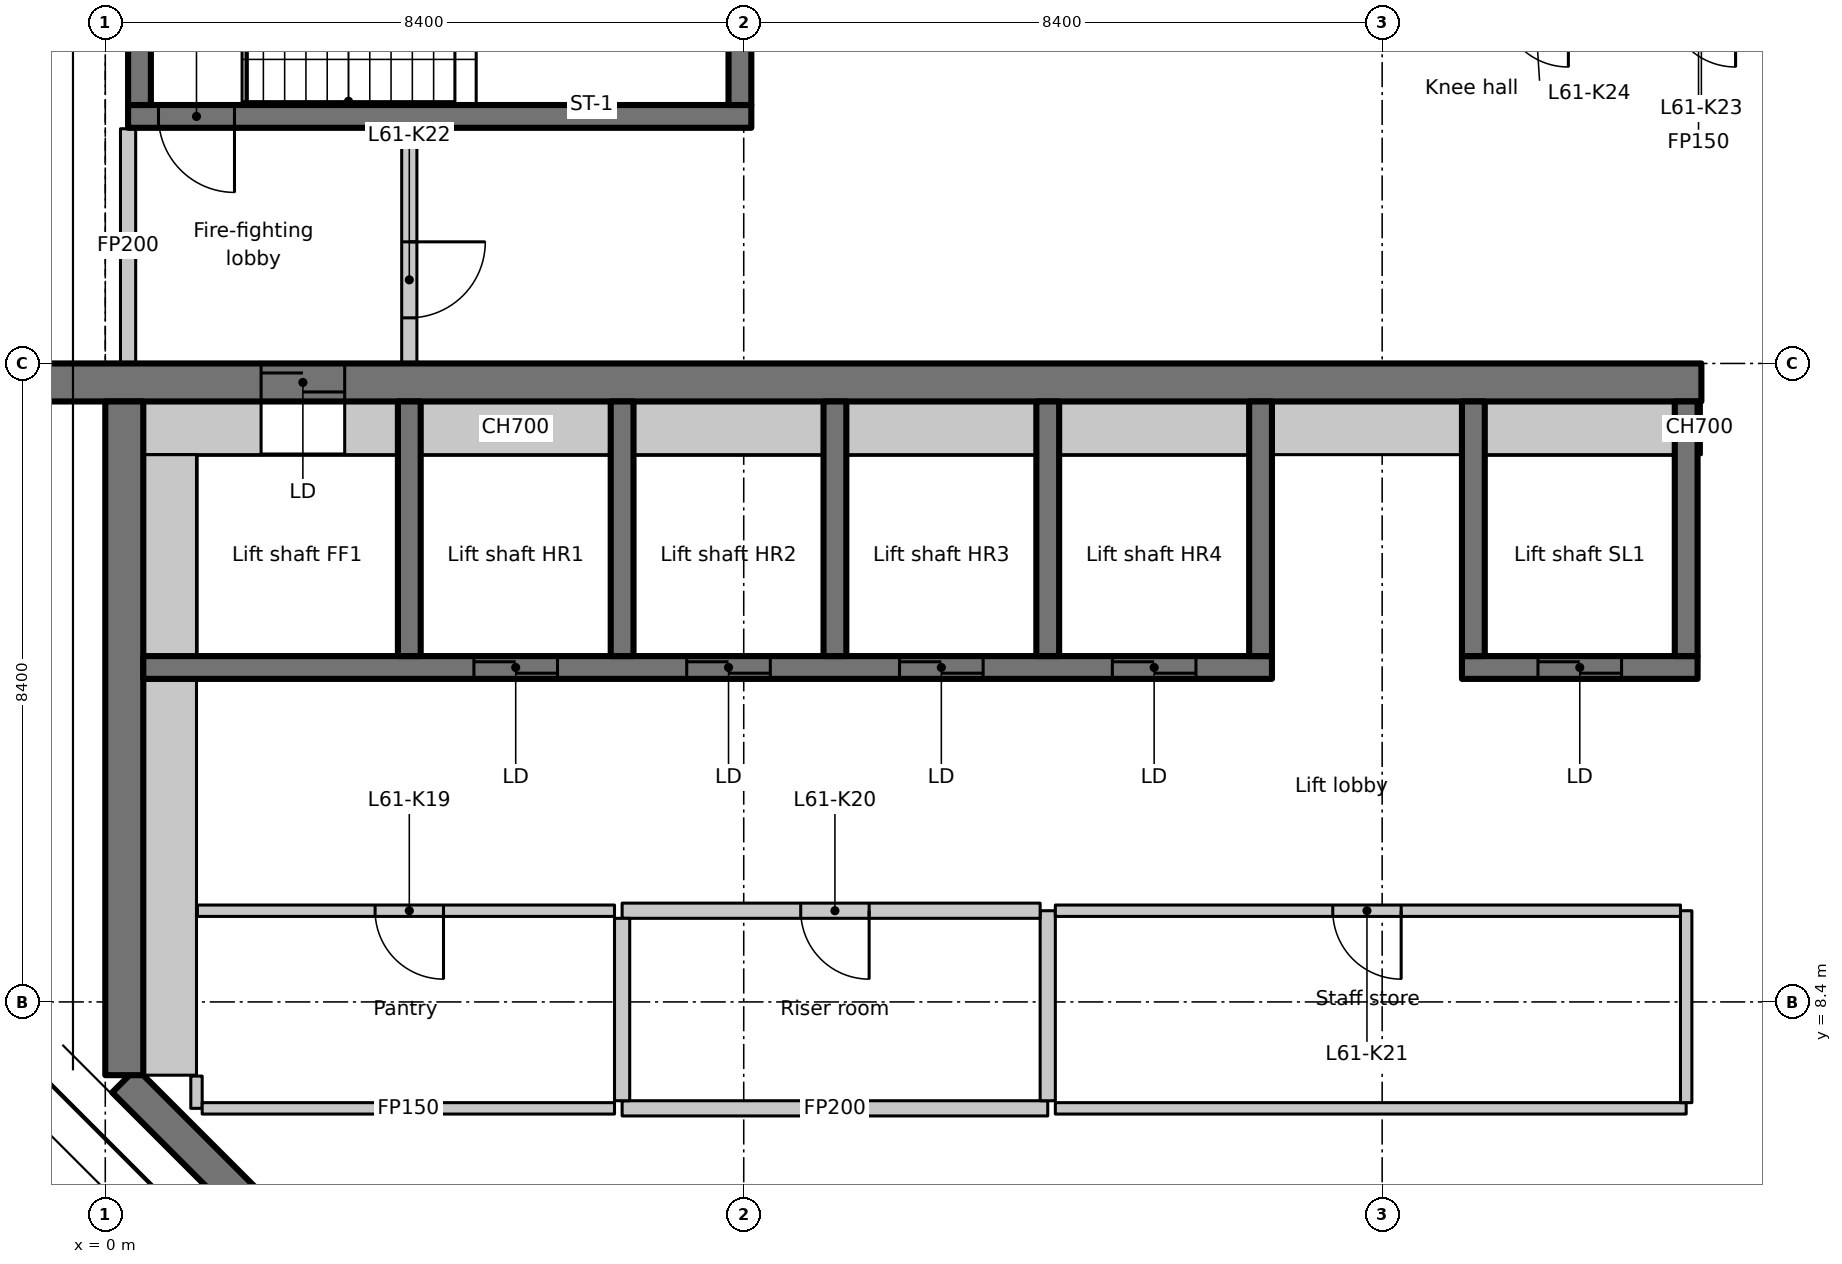
"""IFC4 building model, lengths in metres.
Left out: names, types, materials, properties, quantities, classifications, styles, units other than length and angle.
Written with IfcOpenShell. Run it as: python <this file> out.ifc"""

import sys

from ifc_helpers import new_model, si_unit, direction, frame, frame_2d, origin, place, context, subcontext, project, spatial, rectangle, extrude, element, fill, save


model = new_model("IFC4")
c1 = context("Model", 3, precision=1e-05, world=origin(), true_north=direction((0.0, 1.0)))
c2 = subcontext(c1, "Body", "Model", "MODEL_VIEW")
j1 = project(units=[si_unit("LENGTHUNIT", "METRE"), si_unit("PLANEANGLEUNIT", "RADIAN")], contexts=[c1])
p1 = place(None, origin())
s1 = spatial("IfcSite", under=j1, at=p1, CompositionType="ELEMENT")
p2 = place(p1, origin())
s2 = spatial("IfcBuilding", under=s1, at=p2, CompositionType="ELEMENT")
p3 = place(p2, frame((0.0, 0.0, 240.9)))
s3 = spatial("IfcBuildingStorey", under=s2, at=p3, CompositionType="ELEMENT", Elevation=240.9)
p4 = place(p3, frame((0.25, 7.368, 0.0), z_axis=(0.0, 0.0, 1.0), x_axis=(0.707106781187, -0.707106781187, 0.0)))
e1 = element("IfcWall", 1, at=p4, inside=s3, PredefinedType="SHEAR", context=c2, shape_type="SweptSolid", body=[
    extrude(rectangle(XDim=10.067, YDim=0.45, at=frame_2d((5.033, 0.0))), origin(), (0.0, 0.0, 1.0), 3.35),
])
p5 = place(p3, frame((-1.1, 16.55, 0.0), z_axis=(0.0, 0.0, 1.0), x_axis=(1.0, 0.0, 0.0)))
e2 = element("IfcWall", 2, at=p5, inside=s3, PredefinedType="SHEAR", context=c2, shape_type="SweptSolid", body=[
    extrude(rectangle(XDim=22.1, YDim=0.5, at=frame_2d((11.05, 0.0))), origin(), (0.0, 0.0, 1.0), 3.35),
])
p6 = place(p5, frame((3.15, 0.0, 0.0)))
e3 = element("IfcOpeningElement", 3, at=p6, cuts=e2, PredefinedType="OPENING", context=c2, shape_type="SweptSolid", body=[
    extrude(rectangle(XDim=1.1, YDim=2.3, at=frame_2d((0.55, 1.15))), frame((0.0, 0.26, 0.0), z_axis=(0.0, -1.0, 0.0), x_axis=(1.0, 0.0, 0.0)), (0.0, 0.0, 1.0), 0.52),
])
p7 = place(p3, frame((0.25, 7.436, 0.0), z_axis=(0.0, 0.0, 1.0), x_axis=(0.0, 1.0, 0.0)))
e4 = element("IfcWall", 4, at=p7, inside=s3, PredefinedType="SHEAR", context=c2, shape_type="SweptSolid", body=[
    extrude(rectangle(XDim=8.864, YDim=0.5, at=frame_2d((4.432, 0.0))), origin(), (0.0, 0.0, 1.0), 3.35),
])
p8 = place(p3, frame((0.5, 15.95, 0.0), z_axis=(0.0, 0.0, 1.0), x_axis=(1.0, 0.0, 0.0)))
e5 = element("IfcWall", 5, at=p8, inside=s3, PredefinedType="PARTITIONING", context=c2, shape_type="SweptSolid", body=[
    extrude(rectangle(XDim=1.55, YDim=0.7, at=frame_2d((0.775, 0.0))), origin(), (0.0, 0.0, 1.0), 3.35),
])
p9 = place(p3, frame((0.5, 12.8, 0.0), z_axis=(0.0, 0.0, 1.0), x_axis=(1.0, 0.0, 0.0)))
e6 = element("IfcWall", 6, at=p9, inside=s3, PredefinedType="SHEAR", context=c2, shape_type="SweptSolid", body=[
    extrude(rectangle(XDim=14.85, YDim=0.3, at=frame_2d((7.425, 0.0))), origin(), (0.0, 0.0, 1.0), 3.35),
])
p10 = place(p9, frame((4.35, 0.0, 0.0)))
e7 = element("IfcOpeningElement", 7, at=p10, cuts=e6, PredefinedType="OPENING", context=c2, shape_type="SweptSolid", body=[
    extrude(rectangle(XDim=1.1, YDim=2.3, at=frame_2d((0.55, 1.15))), frame((0.0, 0.16, 0.0), z_axis=(0.0, -1.0, 0.0), x_axis=(1.0, 0.0, 0.0)), (0.0, 0.0, 1.0), 0.32),
])
p11 = place(p9, frame((7.15, 0.0, 0.0)))
e8 = element("IfcOpeningElement", 8, at=p11, cuts=e6, PredefinedType="OPENING", context=c2, shape_type="SweptSolid", body=[
    extrude(rectangle(XDim=1.1, YDim=2.3, at=frame_2d((0.55, 1.15))), frame((0.0, 0.16, 0.0), z_axis=(0.0, -1.0, 0.0), x_axis=(1.0, 0.0, 0.0)), (0.0, 0.0, 1.0), 0.32),
])
p12 = place(p9, frame((9.95, 0.0, 0.0)))
e9 = element("IfcOpeningElement", 9, at=p12, cuts=e6, PredefinedType="OPENING", context=c2, shape_type="SweptSolid", body=[
    extrude(rectangle(XDim=1.1, YDim=2.3, at=frame_2d((0.55, 1.15))), frame((0.0, 0.16, 0.0), z_axis=(0.0, -1.0, 0.0), x_axis=(1.0, 0.0, 0.0)), (0.0, 0.0, 1.0), 0.32),
])
p13 = place(p9, frame((12.75, 0.0, 0.0)))
e10 = element("IfcOpeningElement", 10, at=p13, cuts=e6, PredefinedType="OPENING", context=c2, shape_type="SweptSolid", body=[
    extrude(rectangle(XDim=1.1, YDim=2.3, at=frame_2d((0.55, 1.15))), frame((0.0, 0.16, 0.0), z_axis=(0.0, -1.0, 0.0), x_axis=(1.0, 0.0, 0.0)), (0.0, 0.0, 1.0), 0.32),
])
for number, where, z_axis, x_axis in (
    (11, (4.0, 12.95, 0.0), (0.0, 0.0, 1.0), (0.0, 1.0, 0.0)),
    (12, (6.8, 12.95, 0.0), (0.0, 0.0, 1.0), (0.0, 1.0, 0.0)),
    (13, (9.6, 12.95, 0.0), (0.0, 0.0, 1.0), (0.0, 1.0, 0.0)),
    (14, (12.4, 12.95, 0.0), (0.0, 0.0, 1.0), (0.0, 1.0, 0.0)),
    (15, (15.2, 12.95, 0.0), (0.0, 0.0, 1.0), (0.0, 1.0, 0.0)),
):
    element("IfcWall", number, at=place(p3, frame(where, z_axis=z_axis, x_axis=x_axis)), inside=s3, PredefinedType="SHEAR", context=c2, shape_type="SweptSolid", body=[
        extrude(rectangle(XDim=3.35, YDim=0.3, at=frame_2d((1.675, 0.0))), origin(), (0.0, 0.0, 1.0), 3.35),
    ])
p14 = place(p3, frame((17.85, 12.8, 0.0), z_axis=(0.0, 0.0, 1.0), x_axis=(1.0, 0.0, 0.0)))
e16 = element("IfcWall", 16, at=p14, inside=s3, PredefinedType="SHEAR", context=c2, shape_type="SweptSolid", body=[
    extrude(rectangle(XDim=3.1, YDim=0.3, at=frame_2d((1.55, 0.0))), origin(), (0.0, 0.0, 1.0), 3.35),
])
p15 = place(p14, frame((1.0, 0.0, 0.0)))
e17 = element("IfcOpeningElement", 17, at=p15, cuts=e16, PredefinedType="OPENING", context=c2, shape_type="SweptSolid", body=[
    extrude(rectangle(XDim=1.1, YDim=2.3, at=frame_2d((0.55, 1.15))), frame((0.0, 0.16, 0.0), z_axis=(0.0, -1.0, 0.0), x_axis=(1.0, 0.0, 0.0)), (0.0, 0.0, 1.0), 0.32),
])
for number, where, z_axis, x_axis in (
    (18, (18.0, 12.95, 0.0), (0.0, 0.0, 1.0), (0.0, 1.0, 0.0)),
    (19, (20.8, 12.95, 0.0), (0.0, 0.0, 1.0), (0.0, 1.0, 0.0)),
):
    element("IfcWall", number, at=place(p3, frame(where, z_axis=z_axis, x_axis=x_axis)), inside=s3, PredefinedType="SHEAR", context=c2, shape_type="SweptSolid", body=[
        extrude(rectangle(XDim=3.35, YDim=0.3, at=frame_2d((1.675, 0.0))), origin(), (0.0, 0.0, 1.0), 3.35),
    ])
p16 = place(p3, frame((8.5, 20.05, 0.0), z_axis=(0.0, 0.0, 1.0), x_axis=(-1.0, 0.0, 0.0)))
e20 = element("IfcWall", 20, at=p16, inside=s3, PredefinedType="SHEAR", context=c2, shape_type="SweptSolid", body=[
    extrude(rectangle(XDim=8.2, YDim=0.3, at=frame_2d((4.1, 0.0))), origin(), (0.0, 0.0, 1.0), 3.35),
])
p17 = place(p16, frame((6.8, 0.0, 0.0)))
e21 = element("IfcOpeningElement", 21, at=p17, cuts=e20, PredefinedType="OPENING", context=c2, shape_type="SweptSolid", body=[
    extrude(rectangle(XDim=1.0, YDim=2.1, at=frame_2d((0.5, 1.05))), frame((0.0, 0.16, 0.0), z_axis=(0.0, -1.0, 0.0), x_axis=(1.0, 0.0, 0.0)), (0.0, 0.0, 1.0), 0.32),
])
for number, where, z_axis, x_axis in (
    (22, (0.45, 20.2, 0.0), (0.0, 0.0, 1.0), (0.0, 1.0, 0.0)),
    (23, (8.35, 20.2, 0.0), (0.0, 0.0, 1.0), (0.0, 1.0, 0.0)),
):
    element("IfcWall", number, at=place(p3, frame(where, z_axis=z_axis, x_axis=x_axis)), inside=s3, PredefinedType="SHEAR", context=c2, shape_type="SweptSolid", body=[
        extrude(rectangle(XDim=2.55, YDim=0.3, at=frame_2d((1.275, 0.0))), origin(), (0.0, 0.0, 1.0), 3.35),
    ])
p18 = place(p3, frame((0.3, 16.812, 0.0), z_axis=(0.0, 0.0, 1.0), x_axis=(0.0, 1.0, 0.0)))
e24 = element("IfcWall", 24, at=p18, inside=s3, PredefinedType="PARTITIONING", context=c2, shape_type="SweptSolid", body=[
    extrude(rectangle(XDim=3.076, YDim=0.2, at=frame_2d((1.538, 0.0))), origin(), (0.0, 0.0, 1.0), 2.98),
])
p19 = place(p3, frame((4.0, 19.888, 0.0), z_axis=(0.0, 0.0, 1.0), x_axis=(0.0, -1.0, 0.0)))
e25 = element("IfcWall", 25, at=p19, inside=s3, PredefinedType="PARTITIONING", context=c2, shape_type="SweptSolid", body=[
    extrude(rectangle(XDim=3.076, YDim=0.2, at=frame_2d((1.538, 0.0))), origin(), (0.0, 0.0, 1.0), 3.35),
])
p20 = place(p19, frame((1.488, 0.0, 0.0)))
e26 = element("IfcOpeningElement", 26, at=p20, cuts=e25, PredefinedType="OPENING", context=c2, shape_type="SweptSolid", body=[
    extrude(rectangle(XDim=1.0, YDim=2.1, at=frame_2d((0.5, 1.05))), frame((0.0, 0.11, 0.0), z_axis=(0.0, -1.0, 0.0), x_axis=(1.0, 0.0, 0.0)), (0.0, 0.0, 1.0), 0.22),
])
p21 = place(p3, frame((6.8, 7.0, 0.0), z_axis=(0.0, 0.0, 1.0), x_axis=(1.0, 0.0, 0.0)))
e27 = element("IfcWall", 27, at=p21, inside=s3, PredefinedType="PARTITIONING", context=c2, shape_type="SweptSolid", body=[
    extrude(rectangle(XDim=5.6, YDim=0.2, at=frame_2d((2.8, 0.0))), origin(), (0.0, 0.0, 1.0), 3.35),
])
p22 = place(p3, frame((12.4, 7.1, 0.0), z_axis=(0.0, 0.0, 1.0), x_axis=(0.0, 1.0, 0.0)))
e28 = element("IfcWall", 28, at=p22, inside=s3, PredefinedType="PARTITIONING", context=c2, shape_type="SweptSolid", body=[
    extrude(rectangle(XDim=2.5, YDim=0.2, at=frame_2d((1.25, 0.0))), origin(), (0.0, 0.0, 1.0), 3.35),
])
p23 = place(p3, frame((12.3, 9.6, 0.0), z_axis=(0.0, 0.0, 1.0), x_axis=(-1.0, 0.0, 0.0)))
e29 = element("IfcWall", 29, at=p23, inside=s3, PredefinedType="PARTITIONING", context=c2, shape_type="SweptSolid", body=[
    extrude(rectangle(XDim=5.5, YDim=0.2, at=frame_2d((2.75, 0.0))), origin(), (0.0, 0.0, 1.0), 3.35),
])
p24 = place(p23, frame((2.25, 0.0, 0.0)))
e30 = element("IfcOpeningElement", 30, at=p24, cuts=e29, PredefinedType="OPENING", context=c2, shape_type="SweptSolid", body=[
    extrude(rectangle(XDim=0.9, YDim=2.1, at=frame_2d((0.45, 1.05))), frame((0.0, 0.11, 0.0), z_axis=(0.0, -1.0, 0.0), x_axis=(1.0, 0.0, 0.0)), (0.0, 0.0, 1.0), 0.22),
])
p25 = place(p3, frame((6.8, 9.5, 0.0), z_axis=(0.0, 0.0, 1.0), x_axis=(0.0, -1.0, 0.0)))
e31 = element("IfcWall", 31, at=p25, inside=s3, PredefinedType="PARTITIONING", context=c2, shape_type="SweptSolid", body=[
    extrude(rectangle(XDim=2.4, YDim=0.2, at=frame_2d((1.2, 0.0))), origin(), (0.0, 0.0, 1.0), 3.35),
])
p26 = place(p3, frame((6.7, 9.6, 0.0), z_axis=(0.0, 0.0, 1.0), x_axis=(-1.0, 0.0, 0.0)))
e32 = element("IfcWall", 32, at=p26, inside=s3, PredefinedType="PARTITIONING", context=c2, shape_type="SweptSolid", body=[
    extrude(rectangle(XDim=5.488, YDim=0.15, at=frame_2d((2.744, 0.0))), origin(), (0.0, 0.0, 1.0), 3.35),
])
p27 = place(p26, frame((2.25, 0.0, 0.0)))
e33 = element("IfcOpeningElement", 33, at=p27, cuts=e32, PredefinedType="OPENING", context=c2, shape_type="SweptSolid", body=[
    extrude(rectangle(XDim=0.9, YDim=2.1, at=frame_2d((0.45, 1.05))), frame((0.0, 0.085, 0.0), z_axis=(0.0, -1.0, 0.0), x_axis=(1.0, 0.0, 0.0)), (0.0, 0.0, 1.0), 0.17),
])
p28 = place(p3, frame((1.2, 7.424, 0.0), z_axis=(0.0, 0.0, 1.0), x_axis=(0.0, -1.0, 0.0)))
e34 = element("IfcWall", 34, at=p28, inside=s3, PredefinedType="PARTITIONING", context=c2, shape_type="SweptSolid", body=[
    extrude(rectangle(XDim=0.424, YDim=0.15, at=frame_2d((0.212, 0.0))), origin(), (0.0, 0.0, 1.0), 3.35),
])
p29 = place(p3, frame((1.275, 7.0, 0.0), z_axis=(0.0, 0.0, 1.0), x_axis=(1.0, 0.0, 0.0)))
e35 = element("IfcWall", 35, at=p29, inside=s3, PredefinedType="PARTITIONING", context=c2, shape_type="SweptSolid", body=[
    extrude(rectangle(XDim=5.425, YDim=0.15, at=frame_2d((2.712, 0.0))), origin(), (0.0, 0.0, 1.0), 3.35),
])
p30 = place(p3, frame((12.5, 7.0, 0.0), z_axis=(0.0, 0.0, 1.0), x_axis=(1.0, 0.0, 0.0)))
e36 = element("IfcWall", 36, at=p30, inside=s3, PredefinedType="PARTITIONING", context=c2, shape_type="SweptSolid", body=[
    extrude(rectangle(XDim=8.3, YDim=0.15, at=frame_2d((4.15, 0.0))), origin(), (0.0, 0.0, 1.0), 3.35),
])
p31 = place(p3, frame((20.8, 7.075, 0.0), z_axis=(0.0, 0.0, 1.0), x_axis=(0.0, 1.0, 0.0)))
e37 = element("IfcWall", 37, at=p31, inside=s3, PredefinedType="PARTITIONING", context=c2, shape_type="SweptSolid", body=[
    extrude(rectangle(XDim=2.525, YDim=0.15, at=frame_2d((1.263, 0.0))), origin(), (0.0, 0.0, 1.0), 3.35),
])
p32 = place(p3, frame((20.725, 9.6, 0.0), z_axis=(0.0, 0.0, 1.0), x_axis=(-1.0, 0.0, 0.0)))
e38 = element("IfcWall", 38, at=p32, inside=s3, PredefinedType="PARTITIONING", context=c2, shape_type="SweptSolid", body=[
    extrude(rectangle(XDim=8.225, YDim=0.15, at=frame_2d((4.113, 0.0))), origin(), (0.0, 0.0, 1.0), 3.35),
])
p33 = place(p32, frame((3.675, 0.0, 0.0)))
e39 = element("IfcOpeningElement", 39, at=p33, cuts=e38, PredefinedType="OPENING", context=c2, shape_type="SweptSolid", body=[
    extrude(rectangle(XDim=0.9, YDim=2.1, at=frame_2d((0.45, 1.05))), frame((0.0, 0.085, 0.0), z_axis=(0.0, -1.0, 0.0), x_axis=(1.0, 0.0, 0.0)), (0.0, 0.0, 1.0), 0.17),
])
p34 = place(p3, frame((0.85, 7.436, 0.0), z_axis=(0.0, 0.0, 1.0), x_axis=(0.0, 1.0, 0.0)))
e40 = element("IfcWall", 40, at=p34, inside=s3, PredefinedType="PARTITIONING", context=c2, shape_type="SweptSolid", body=[
    extrude(rectangle(XDim=5.214, YDim=0.7, at=frame_2d((2.607, 0.0))), origin(), (0.0, 0.0, 1.0), 3.35),
])
p35 = place(p3, frame((0.85, 12.95, 0.0), z_axis=(0.0, 0.0, 1.0), x_axis=(0.0, 1.0, 0.0)))
e41 = element("IfcWall", 41, at=p35, inside=s3, PredefinedType="PARTITIONING", context=c2, shape_type="SweptSolid", body=[
    extrude(rectangle(XDim=2.65, YDim=0.7, at=frame_2d((1.325, 0.0))), origin(), (0.0, 0.0, 1.0), 3.35),
])
p36 = place(p3, frame((3.15, 15.95, 0.0), z_axis=(0.0, 0.0, 1.0), x_axis=(1.0, 0.0, 0.0)))
e42 = element("IfcWall", 42, at=p36, inside=s3, PredefinedType="PARTITIONING", context=c2, shape_type="SweptSolid", body=[
    extrude(rectangle(XDim=0.7, YDim=0.7, at=frame_2d((0.35, 0.0))), origin(), (0.0, 0.0, 1.0), 3.35),
])
for number, where, z_axis, x_axis in (
    (43, (4.15, 15.95, 0.0), (0.0, 0.0, 1.0), (1.0, 0.0, 0.0)),
    (44, (6.95, 15.95, 0.0), (0.0, 0.0, 1.0), (1.0, 0.0, 0.0)),
    (45, (9.75, 15.95, 0.0), (0.0, 0.0, 1.0), (1.0, 0.0, 0.0)),
    (46, (12.55, 15.95, 0.0), (0.0, 0.0, 1.0), (1.0, 0.0, 0.0)),
    (47, (15.35, 15.95, 0.0), (0.0, 0.0, 1.0), (1.0, 0.0, 0.0)),
    (48, (18.15, 15.95, 0.0), (0.0, 0.0, 1.0), (1.0, 0.0, 0.0)),
):
    element("IfcWall", number, at=place(p3, frame(where, z_axis=z_axis, x_axis=x_axis)), inside=s3, PredefinedType="PARTITIONING", context=c2, shape_type="SweptSolid", body=[
        extrude(rectangle(XDim=2.5, YDim=0.7, at=frame_2d((1.25, 0.0))), origin(), (0.0, 0.0, 1.0), 3.35),
    ])
p37 = place(p3, frame((20.95, 15.95, 0.0), z_axis=(0.0, 0.0, 1.0), x_axis=(1.0, 0.0, 0.0)))
e49 = element("IfcWall", 49, at=p37, inside=s3, PredefinedType="PARTITIONING", context=c2, shape_type="SweptSolid", body=[
    extrude(rectangle(XDim=0.05, YDim=0.7, at=frame_2d((0.025, 0.0))), origin(), (0.0, 0.0, 1.0), 3.35),
])
p38 = place(p6, origin())
e50 = element("IfcDoor", 50, at=p38, inside=s3, OperationType="SLIDING_TO_LEFT", PredefinedType="DOOR", context=c2, shape_type="SweptSolid", body=[
    extrude(rectangle(XDim=1.1, YDim=2.3, at=frame_2d((0.55, 1.15))), frame((0.0, 0.025, 0.0), z_axis=(0.0, -1.0, 0.0), x_axis=(1.0, 0.0, 0.0)), (0.0, 0.0, 1.0), 0.05),
])
fill(e3, e50)
p39 = place(p10, origin())
e51 = element("IfcDoor", 51, at=p39, inside=s3, OperationType="SLIDING_TO_LEFT", PredefinedType="DOOR", context=c2, shape_type="SweptSolid", body=[
    extrude(rectangle(XDim=1.1, YDim=2.3, at=frame_2d((0.55, 1.15))), frame((0.0, 0.025, 0.0), z_axis=(0.0, -1.0, 0.0), x_axis=(1.0, 0.0, 0.0)), (0.0, 0.0, 1.0), 0.05),
])
fill(e7, e51)
p40 = place(p11, origin())
e52 = element("IfcDoor", 52, at=p40, inside=s3, OperationType="SLIDING_TO_LEFT", PredefinedType="DOOR", context=c2, shape_type="SweptSolid", body=[
    extrude(rectangle(XDim=1.1, YDim=2.3, at=frame_2d((0.55, 1.15))), frame((0.0, 0.025, 0.0), z_axis=(0.0, -1.0, 0.0), x_axis=(1.0, 0.0, 0.0)), (0.0, 0.0, 1.0), 0.05),
])
fill(e8, e52)
p41 = place(p12, origin())
e53 = element("IfcDoor", 53, at=p41, inside=s3, OperationType="SLIDING_TO_LEFT", PredefinedType="DOOR", context=c2, shape_type="SweptSolid", body=[
    extrude(rectangle(XDim=1.1, YDim=2.3, at=frame_2d((0.55, 1.15))), frame((0.0, 0.025, 0.0), z_axis=(0.0, -1.0, 0.0), x_axis=(1.0, 0.0, 0.0)), (0.0, 0.0, 1.0), 0.05),
])
fill(e9, e53)
p42 = place(p13, origin())
e54 = element("IfcDoor", 54, at=p42, inside=s3, OperationType="SLIDING_TO_LEFT", PredefinedType="DOOR", context=c2, shape_type="SweptSolid", body=[
    extrude(rectangle(XDim=1.1, YDim=2.3, at=frame_2d((0.55, 1.15))), frame((0.0, 0.025, 0.0), z_axis=(0.0, -1.0, 0.0), x_axis=(1.0, 0.0, 0.0)), (0.0, 0.0, 1.0), 0.05),
])
fill(e10, e54)
p43 = place(p15, origin())
e55 = element("IfcDoor", 55, at=p43, inside=s3, OperationType="SLIDING_TO_LEFT", PredefinedType="DOOR", context=c2, shape_type="SweptSolid", body=[
    extrude(rectangle(XDim=1.1, YDim=2.3, at=frame_2d((0.55, 1.15))), frame((0.0, 0.025, 0.0), z_axis=(0.0, -1.0, 0.0), x_axis=(1.0, 0.0, 0.0)), (0.0, 0.0, 1.0), 0.05),
])
fill(e17, e55)
p44 = place(p17, origin())
e56 = element("IfcDoor", 56, at=p44, inside=s3, OperationType="SINGLE_SWING_LEFT", PredefinedType="DOOR", context=c2, shape_type="SweptSolid", body=[
    extrude(rectangle(XDim=1.0, YDim=2.1, at=frame_2d((0.5, 1.05))), frame((0.0, 0.025, 0.0), z_axis=(0.0, -1.0, 0.0), x_axis=(1.0, 0.0, 0.0)), (0.0, 0.0, 1.0), 0.05),
])
fill(e21, e56)
p45 = place(p27, origin())
e57 = element("IfcDoor", 57, at=p45, inside=s3, OperationType="SINGLE_SWING_RIGHT", PredefinedType="DOOR", context=c2, shape_type="SweptSolid", body=[
    extrude(rectangle(XDim=0.9, YDim=2.1, at=frame_2d((0.45, 1.05))), frame((0.0, 0.025, 0.0), z_axis=(0.0, -1.0, 0.0), x_axis=(1.0, 0.0, 0.0)), (0.0, 0.0, 1.0), 0.05),
])
fill(e33, e57)
p46 = place(p24, origin())
e58 = element("IfcDoor", 58, at=p46, inside=s3, OperationType="SINGLE_SWING_LEFT", PredefinedType="DOOR", context=c2, shape_type="SweptSolid", body=[
    extrude(rectangle(XDim=0.9, YDim=2.1, at=frame_2d((0.45, 1.05))), frame((0.0, 0.025, 0.0), z_axis=(0.0, -1.0, 0.0), x_axis=(1.0, 0.0, 0.0)), (0.0, 0.0, 1.0), 0.05),
])
fill(e30, e58)
p47 = place(p33, origin())
e59 = element("IfcDoor", 59, at=p47, inside=s3, OperationType="SINGLE_SWING_RIGHT", PredefinedType="DOOR", context=c2, shape_type="SweptSolid", body=[
    extrude(rectangle(XDim=0.9, YDim=2.1, at=frame_2d((0.45, 1.05))), frame((0.0, 0.025, 0.0), z_axis=(0.0, -1.0, 0.0), x_axis=(1.0, 0.0, 0.0)), (0.0, 0.0, 1.0), 0.05),
])
fill(e39, e59)
p48 = place(p20, origin())
e60 = element("IfcDoor", 60, at=p48, inside=s3, OperationType="SINGLE_SWING_LEFT", PredefinedType="DOOR", context=c2, shape_type="SweptSolid", body=[
    extrude(rectangle(XDim=1.0, YDim=2.1, at=frame_2d((0.5, 1.05))), frame((0.0, 0.025, 0.0), z_axis=(0.0, -1.0, 0.0), x_axis=(1.0, 0.0, 0.0)), (0.0, 0.0, 1.0), 0.05),
])
fill(e26, e60)
save(model, sys.argv[1])
